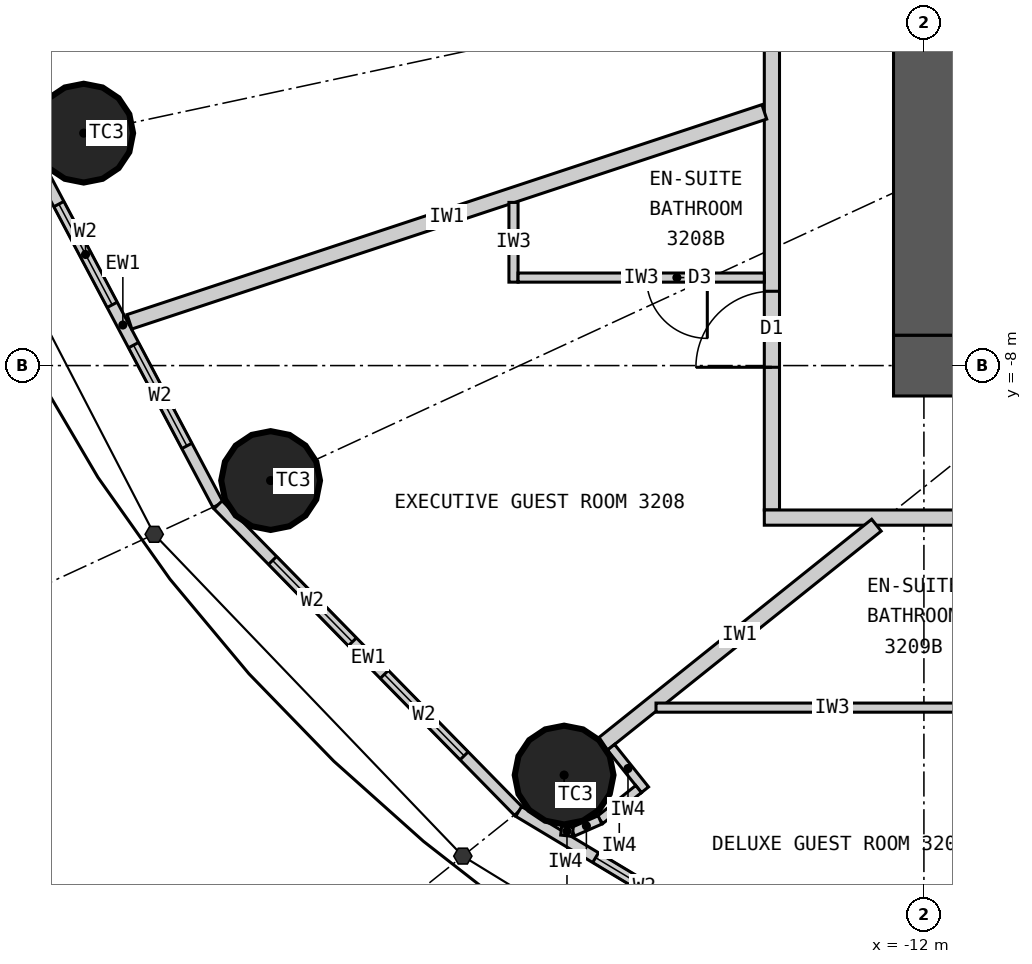
"""IFC4 building model, lengths in metres.
Left out: names, types, materials, properties, quantities, classifications, styles, units other than length and angle.
Written with IfcOpenShell. Run it as: python <this file> out.ifc"""

import sys

from ifc_helpers import new_model, si_unit, direction, frame, frame_2d, origin, origin_2d, place, context, subcontext, project, spatial, rectangle, circle, extrude, element, fill, save


model = new_model("IFC4")
c1 = context("Model", 3, precision=1e-05, world=origin(), true_north=direction((0.0, 1.0)))
c2 = subcontext(c1, "Body", "Model", "MODEL_VIEW")
j1 = project(units=[si_unit("LENGTHUNIT", "METRE"), si_unit("PLANEANGLEUNIT", "RADIAN")], contexts=[c1])
p1 = place(None, origin())
s1 = spatial("IfcSite", under=j1, at=p1, CompositionType="ELEMENT")
p2 = place(p1, origin())
s2 = spatial("IfcBuilding", under=s1, at=p2, CompositionType="ELEMENT")
p3 = place(p2, frame((0.0, 0.0, 125.4)))
s3 = spatial("IfcBuildingStorey", under=s2, at=p3, CompositionType="ELEMENT", Elevation=125.4)
for number, where, z_axis, x_axis in (
    (1, (-23.055, -4.942, 0.0), (0.0, 0.0, 1.0), (1.0, 0.0, 0.0)),
    (2, (-20.596, -9.513, 0.0), (0.0, 0.0, 1.0), (1.0, 0.0, 0.0)),
    (3, (-16.734, -13.387, 0.0), (0.0, 0.0, 1.0), (1.0, 0.0, 0.0)),
):
    element("IfcColumn", number, at=place(p3, frame(where, z_axis=z_axis, x_axis=x_axis)), inside=s3, PredefinedType="COLUMN", context=c2, shape_type="SweptSolid", body=[
        extrude(circle(Radius=0.65, at=origin_2d()), origin(), (0.0, 0.0, 1.0), 3.3),
    ])
p4 = place(p3, frame((12.4, -8.0, 0.0), z_axis=(0.0, 0.0, 1.0), x_axis=(-1.0, 0.0, 0.0)))
e4 = element("IfcWall", 4, at=p4, inside=s3, PredefinedType="SHEAR", context=c2, shape_type="SweptSolid", body=[
    extrude(rectangle(XDim=24.8, YDim=0.8, at=frame_2d((12.4, 0.0))), origin(), (0.0, 0.0, 1.0), 3.3),
])
p5 = place(p4, frame((11.1, 0.0, 0.0)))
e5 = element("IfcOpeningElement", 5, at=p5, cuts=e4, PredefinedType="OPENING", context=c2, shape_type="SweptSolid", body=[
    extrude(rectangle(XDim=1.2, YDim=2.2, at=frame_2d((0.6, 1.1))), frame((0.0, 0.41, 0.0), z_axis=(0.0, -1.0, 0.0), x_axis=(1.0, 0.0, 0.0)), (0.0, 0.0, 1.0), 0.82),
])
p6 = place(p4, frame((18.7, 0.0, 0.0)))
e6 = element("IfcOpeningElement", 6, at=p6, cuts=e4, PredefinedType="OPENING", context=c2, shape_type="SweptSolid", body=[
    extrude(rectangle(XDim=0.9, YDim=2.2, at=frame_2d((0.45, 1.1))), frame((0.0, 0.41, 0.0), z_axis=(0.0, -1.0, 0.0), x_axis=(1.0, 0.0, 0.0)), (0.0, 0.0, 1.0), 0.82),
])
p7 = place(p3, frame((-12.0, 7.6, 0.0), z_axis=(0.0, 0.0, 1.0), x_axis=(0.0, -1.0, 0.0)))
e7 = element("IfcWall", 7, at=p7, inside=s3, PredefinedType="SHEAR", context=c2, shape_type="SweptSolid", body=[
    extrude(rectangle(XDim=15.2, YDim=0.8, at=frame_2d((7.6, 0.0))), origin(), (0.0, 0.0, 1.0), 3.3),
])
p8 = place(p7, frame((6.7, 0.0, 0.0)))
e8 = element("IfcOpeningElement", 8, at=p8, cuts=e7, PredefinedType="OPENING", context=c2, shape_type="SweptSolid", body=[
    extrude(rectangle(XDim=1.8, YDim=2.2, at=frame_2d((0.9, 1.1))), frame((0.0, 0.41, 0.0), z_axis=(0.0, -1.0, 0.0), x_axis=(1.0, 0.0, 0.0)), (0.0, 0.0, 1.0), 0.82),
])
p9 = place(p3, frame((-23.792, -5.1, 0.0), z_axis=(0.0, 0.0, 1.0), x_axis=(0.467814388454, -0.883826735257, 0.0)))
e9 = element("IfcWall", 9, at=p9, inside=s3, PredefinedType="ELEMENTEDWALL", context=c2, shape_type="SweptSolid", body=[
    extrude(rectangle(XDim=5.354, YDim=0.15, at=frame_2d((2.677, 0.0))), origin(), (0.0, 0.0, 1.0), 3.12),
])
p10 = place(p9, frame((0.877, 0.0, 0.9)))
e10 = element("IfcOpeningElement", 10, at=p10, cuts=e9, PredefinedType="OPENING", context=c2, shape_type="SweptSolid", body=[
    extrude(rectangle(XDim=1.5, YDim=1.9, at=frame_2d((0.75, 0.95))), frame((0.0, 0.085, 0.0), z_axis=(0.0, -1.0, 0.0), x_axis=(1.0, 0.0, 0.0)), (0.0, 0.0, 1.0), 0.17),
])
p11 = place(p9, frame((2.977, 0.0, 0.9)))
e11 = element("IfcOpeningElement", 11, at=p11, cuts=e9, PredefinedType="OPENING", context=c2, shape_type="SweptSolid", body=[
    extrude(rectangle(XDim=1.5, YDim=1.9, at=frame_2d((0.75, 0.95))), frame((0.0, 0.085, 0.0), z_axis=(0.0, -1.0, 0.0), x_axis=(1.0, 0.0, 0.0)), (0.0, 0.0, 1.0), 0.17),
])
p12 = place(p3, frame((-21.287, -9.832, 0.0), z_axis=(0.0, 0.0, 1.0), x_axis=(0.700136650834, -0.714008872605, 0.0)))
e12 = element("IfcWall", 12, at=p12, inside=s3, PredefinedType="ELEMENTEDWALL", context=c2, shape_type="SweptSolid", body=[
    extrude(rectangle(XDim=5.649, YDim=0.15, at=frame_2d((2.825, 0.0))), origin(), (0.0, 0.0, 1.0), 3.12),
])
p13 = place(p12, frame((1.025, 0.0, 0.9)))
e13 = element("IfcOpeningElement", 13, at=p13, cuts=e12, PredefinedType="OPENING", context=c2, shape_type="SweptSolid", body=[
    extrude(rectangle(XDim=1.5, YDim=1.9, at=frame_2d((0.75, 0.95))), frame((0.0, 0.085, 0.0), z_axis=(0.0, -1.0, 0.0), x_axis=(1.0, 0.0, 0.0)), (0.0, 0.0, 1.0), 0.17),
])
p14 = place(p12, frame((3.125, 0.0, 0.9)))
e14 = element("IfcOpeningElement", 14, at=p14, cuts=e12, PredefinedType="OPENING", context=c2, shape_type="SweptSolid", body=[
    extrude(rectangle(XDim=1.5, YDim=1.9, at=frame_2d((0.75, 0.95))), frame((0.0, 0.085, 0.0), z_axis=(0.0, -1.0, 0.0), x_axis=(1.0, 0.0, 0.0)), (0.0, 0.0, 1.0), 0.17),
])
p15 = place(p3, frame((-17.332, -13.866, 0.0), z_axis=(0.0, 0.0, 1.0), x_axis=(0.857308573723, -0.514802884044, 0.0)))
e15 = element("IfcWall", 15, at=p15, inside=s3, PredefinedType="ELEMENTEDWALL", context=c2, shape_type="SweptSolid", body=[
    extrude(rectangle(XDim=5.961, YDim=0.15, at=frame_2d((2.98, 0.0))), origin(), (0.0, 0.0, 1.0), 3.12),
])
p16 = place(p15, frame((1.181, 0.0, 0.9)))
e16 = element("IfcOpeningElement", 16, at=p16, cuts=e15, PredefinedType="OPENING", context=c2, shape_type="SweptSolid", body=[
    extrude(rectangle(XDim=1.5, YDim=1.9, at=frame_2d((0.75, 0.95))), frame((0.0, 0.085, 0.0), z_axis=(0.0, -1.0, 0.0), x_axis=(1.0, 0.0, 0.0)), (0.0, 0.0, 1.0), 0.17),
])
p17 = place(p15, frame((3.281, 0.0, 0.9)))
e17 = element("IfcOpeningElement", 17, at=p17, cuts=e15, PredefinedType="OPENING", context=c2, shape_type="SweptSolid", body=[
    extrude(rectangle(XDim=1.5, YDim=1.9, at=frame_2d((0.75, 0.95))), frame((0.0, 0.085, 0.0), z_axis=(0.0, -1.0, 0.0), x_axis=(1.0, 0.0, 0.0)), (0.0, 0.0, 1.0), 0.17),
])
p18 = place(p3, frame((-14.0, 9.9, 0.0), z_axis=(0.0, 0.0, 1.0), x_axis=(0.0, -1.0, 0.0)))
e18 = element("IfcWall", 18, at=p18, inside=s3, PredefinedType="PARTITIONING", context=c2, shape_type="SweptSolid", body=[
    extrude(rectangle(XDim=19.8, YDim=0.2, at=frame_2d((9.9, 0.0))), origin(), (0.0, 0.0, 1.0), 3.12),
])
p19 = place(p18, frame((1.678, 0.0, 0.0)))
e19 = element("IfcOpeningElement", 19, at=p19, cuts=e18, PredefinedType="OPENING", context=c2, shape_type="SweptSolid", body=[
    extrude(rectangle(XDim=1.0, YDim=2.2, at=frame_2d((0.5, 1.1))), frame((0.0, 0.11, 0.0), z_axis=(0.0, -1.0, 0.0), x_axis=(1.0, 0.0, 0.0)), (0.0, 0.0, 1.0), 0.22),
])
p20 = place(p18, frame((7.598, 0.0, 0.0)))
e20 = element("IfcOpeningElement", 20, at=p20, cuts=e18, PredefinedType="OPENING", context=c2, shape_type="SweptSolid", body=[
    extrude(rectangle(XDim=1.0, YDim=2.2, at=frame_2d((0.5, 1.1))), frame((0.0, 0.11, 0.0), z_axis=(0.0, -1.0, 0.0), x_axis=(1.0, 0.0, 0.0)), (0.0, 0.0, 1.0), 0.22),
])
p21 = place(p18, frame((12.26, 0.0, 0.0)))
e21 = element("IfcOpeningElement", 21, at=p21, cuts=e18, PredefinedType="OPENING", context=c2, shape_type="SweptSolid", body=[
    extrude(rectangle(XDim=1.0, YDim=2.2, at=frame_2d((0.5, 1.1))), frame((0.0, 0.11, 0.0), z_axis=(0.0, -1.0, 0.0), x_axis=(1.0, 0.0, 0.0)), (0.0, 0.0, 1.0), 0.22),
])
p22 = place(p18, frame((16.922, 0.0, 0.0)))
e22 = element("IfcOpeningElement", 22, at=p22, cuts=e18, PredefinedType="OPENING", context=c2, shape_type="SweptSolid", body=[
    extrude(rectangle(XDim=1.0, YDim=2.2, at=frame_2d((0.5, 1.1))), frame((0.0, 0.11, 0.0), z_axis=(0.0, -1.0, 0.0), x_axis=(1.0, 0.0, 0.0)), (0.0, 0.0, 1.0), 0.22),
])
p23 = place(p3, frame((-3.283, -10.0, 0.0), z_axis=(0.0, 0.0, 1.0), x_axis=(-1.0, 0.0, 0.0)))
e23 = element("IfcWall", 23, at=p23, inside=s3, PredefinedType="PARTITIONING", context=c2, shape_type="SweptSolid", body=[
    extrude(rectangle(XDim=10.817, YDim=0.2, at=frame_2d((5.409, 0.0))), origin(), (0.0, 0.0, 1.0), 3.12),
])
p24 = place(p23, frame((6.482, 0.0, 0.0)))
e24 = element("IfcOpeningElement", 24, at=p24, cuts=e23, PredefinedType="OPENING", context=c2, shape_type="SweptSolid", body=[
    extrude(rectangle(XDim=1.0, YDim=2.2, at=frame_2d((0.5, 1.1))), frame((0.0, 0.11, 0.0), z_axis=(0.0, -1.0, 0.0), x_axis=(1.0, 0.0, 0.0)), (0.0, 0.0, 1.0), 0.22),
])
p25 = place(p3, frame((-14.1, -4.662, 0.0), z_axis=(0.0, 0.0, 1.0), x_axis=(-0.949446466373, -0.313928984789, 0.0)))
e25 = element("IfcWall", 25, at=p25, inside=s3, PredefinedType="PARTITIONING", context=c2, shape_type="SweptSolid", body=[
    extrude(rectangle(XDim=8.797, YDim=0.2, at=frame_2d((4.399, 0.0))), origin(), (0.0, 0.0, 1.0), 3.12),
])
p26 = place(p3, frame((-12.625, -10.1, 0.0), z_axis=(0.0, 0.0, 1.0), x_axis=(-0.780863644897, -0.624701503182, 0.0)))
e26 = element("IfcWall", 26, at=p26, inside=s3, PredefinedType="PARTITIONING", context=c2, shape_type="SweptSolid", body=[
    extrude(rectangle(XDim=4.612, YDim=0.2, at=frame_2d((2.306, 0.0))), origin(), (0.0, 0.0, 1.0), 2.37),
])
p27 = place(p3, frame((-17.4, -5.854, 0.0), z_axis=(0.0, 0.0, 1.0), x_axis=(0.0, -1.0, 0.0)))
e27 = element("IfcWall", 27, at=p27, inside=s3, PredefinedType="PARTITIONING", context=c2, shape_type="SweptSolid", body=[
    extrude(rectangle(XDim=1.049, YDim=0.12, at=frame_2d((0.524, 0.0))), origin(), (0.0, 0.0, 1.0), 3.12),
])
p28 = place(p3, frame((-14.1, -6.842, 0.0), z_axis=(0.0, 0.0, 1.0), x_axis=(-1.0, 0.0, 0.0)))
e28 = element("IfcWall", 28, at=p28, inside=s3, PredefinedType="PARTITIONING", context=c2, shape_type="SweptSolid", body=[
    extrude(rectangle(XDim=3.24, YDim=0.12, at=frame_2d((1.62, 0.0))), origin(), (0.0, 0.0, 1.0), 3.12),
])
p29 = place(p28, frame((0.75, 0.0, 0.0)))
e29 = element("IfcOpeningElement", 29, at=p29, cuts=e28, PredefinedType="OPENING", context=c2, shape_type="SweptSolid", body=[
    extrude(rectangle(XDim=0.8, YDim=2.1, at=frame_2d((0.4, 1.05))), frame((0.0, 0.07, 0.0), z_axis=(0.0, -1.0, 0.0), x_axis=(1.0, 0.0, 0.0)), (0.0, 0.0, 1.0), 0.14),
])
p30 = place(p3, frame((-15.525, -12.5, 0.0), z_axis=(0.0, 0.0, 1.0), x_axis=(1.0, 0.0, 0.0)))
e30 = element("IfcWall", 30, at=p30, inside=s3, PredefinedType="PARTITIONING", context=c2, shape_type="SweptSolid", body=[
    extrude(rectangle(XDim=4.64, YDim=0.12, at=frame_2d((2.32, 0.0))), origin(), (0.0, 0.0, 1.0), 3.12),
])
p31 = place(p3, frame((-16.117, -13.022, 0.0), z_axis=(0.0, 0.0, 1.0), x_axis=(0.62465344249, -0.780902091677, 0.0)))
e31 = element("IfcWall", 31, at=p31, inside=s3, PredefinedType="PARTITIONING", context=c2, shape_type="SweptSolid", body=[
    extrude(rectangle(XDim=0.716, YDim=0.12, at=frame_2d((0.358, 0.0))), origin(), (0.0, 0.0, 1.0), 3.12),
])
p32 = place(p3, frame((-15.754, -13.571, 0.0), z_axis=(0.0, 0.0, 1.0), x_axis=(-0.780905453553, -0.624649239663, 0.0)))
e32 = element("IfcWall", 32, at=p32, inside=s3, PredefinedType="PARTITIONING", context=c2, shape_type="SweptSolid", body=[
    extrude(rectangle(XDim=0.65, YDim=0.12, at=frame_2d((0.325, 0.0))), origin(), (0.0, 0.0, 1.0), 3.12),
])
p33 = place(p3, frame((-16.262, -13.977, 0.0), z_axis=(0.0, 0.0, 1.0), x_axis=(-0.915985403703, -0.401211590314, 0.0)))
e33 = element("IfcWall", 33, at=p33, inside=s3, PredefinedType="PARTITIONING", context=c2, shape_type="SweptSolid", body=[
    extrude(rectangle(XDim=0.391, YDim=0.12, at=frame_2d((0.196, 0.0))), origin(), (0.0, 0.0, 1.0), 3.12),
])
p34 = place(p3, frame((-16.62, -14.134, 0.0), z_axis=(0.0, 0.0, 1.0), x_axis=(-0.993941871493, 0.109907033867, 0.0)))
e34 = element("IfcWall", 34, at=p34, inside=s3, PredefinedType="PARTITIONING", context=c2, shape_type="SweptSolid", body=[
    extrude(rectangle(XDim=0.153, YDim=0.12, at=frame_2d((0.077, 0.0))), origin(), (0.0, 0.0, 1.0), 3.12),
])
p35 = place(p10, origin())
e35 = element("IfcWindow", 35, at=p35, inside=s3, PartitioningType="SINGLE_PANEL", PredefinedType="WINDOW", context=c2, shape_type="SweptSolid", body=[
    extrude(rectangle(XDim=1.5, YDim=1.9, at=frame_2d((0.75, 0.95))), frame((0.0, 0.03, 0.0), z_axis=(0.0, -1.0, 0.0), x_axis=(1.0, 0.0, 0.0)), (0.0, 0.0, 1.0), 0.06),
])
fill(e10, e35)
p36 = place(p11, origin())
e36 = element("IfcWindow", 36, at=p36, inside=s3, PartitioningType="SINGLE_PANEL", PredefinedType="WINDOW", context=c2, shape_type="SweptSolid", body=[
    extrude(rectangle(XDim=1.5, YDim=1.9, at=frame_2d((0.75, 0.95))), frame((0.0, 0.03, 0.0), z_axis=(0.0, -1.0, 0.0), x_axis=(1.0, 0.0, 0.0)), (0.0, 0.0, 1.0), 0.06),
])
fill(e11, e36)
p37 = place(p13, origin())
e37 = element("IfcWindow", 37, at=p37, inside=s3, PartitioningType="SINGLE_PANEL", PredefinedType="WINDOW", context=c2, shape_type="SweptSolid", body=[
    extrude(rectangle(XDim=1.5, YDim=1.9, at=frame_2d((0.75, 0.95))), frame((0.0, 0.03, 0.0), z_axis=(0.0, -1.0, 0.0), x_axis=(1.0, 0.0, 0.0)), (0.0, 0.0, 1.0), 0.06),
])
fill(e13, e37)
p38 = place(p14, origin())
e38 = element("IfcWindow", 38, at=p38, inside=s3, PartitioningType="SINGLE_PANEL", PredefinedType="WINDOW", context=c2, shape_type="SweptSolid", body=[
    extrude(rectangle(XDim=1.5, YDim=1.9, at=frame_2d((0.75, 0.95))), frame((0.0, 0.03, 0.0), z_axis=(0.0, -1.0, 0.0), x_axis=(1.0, 0.0, 0.0)), (0.0, 0.0, 1.0), 0.06),
])
fill(e14, e38)
p39 = place(p16, origin())
e39 = element("IfcWindow", 39, at=p39, inside=s3, PartitioningType="SINGLE_PANEL", PredefinedType="WINDOW", context=c2, shape_type="SweptSolid", body=[
    extrude(rectangle(XDim=1.5, YDim=1.9, at=frame_2d((0.75, 0.95))), frame((0.0, 0.03, 0.0), z_axis=(0.0, -1.0, 0.0), x_axis=(1.0, 0.0, 0.0)), (0.0, 0.0, 1.0), 0.06),
])
fill(e16, e39)
p40 = place(p29, origin())
e40 = element("IfcDoor", 40, at=p40, inside=s3, OperationType="SINGLE_SWING_LEFT", PredefinedType="DOOR", context=c2, shape_type="SweptSolid", body=[
    extrude(rectangle(XDim=0.8, YDim=2.1, at=frame_2d((0.4, 1.05))), frame((0.0, 0.025, 0.0), z_axis=(0.0, -1.0, 0.0), x_axis=(1.0, 0.0, 0.0)), (0.0, 0.0, 1.0), 0.05),
])
fill(e29, e40)
p41 = place(p22, origin())
e41 = element("IfcDoor", 41, at=p41, inside=s3, OperationType="SINGLE_SWING_RIGHT", PredefinedType="DOOR", context=c2, shape_type="SweptSolid", body=[
    extrude(rectangle(XDim=1.0, YDim=2.2, at=frame_2d((0.5, 1.1))), frame((0.0, 0.025, 0.0), z_axis=(0.0, -1.0, 0.0), x_axis=(1.0, 0.0, 0.0)), (0.0, 0.0, 1.0), 0.05),
])
fill(e22, e41)
save(model, sys.argv[1])
